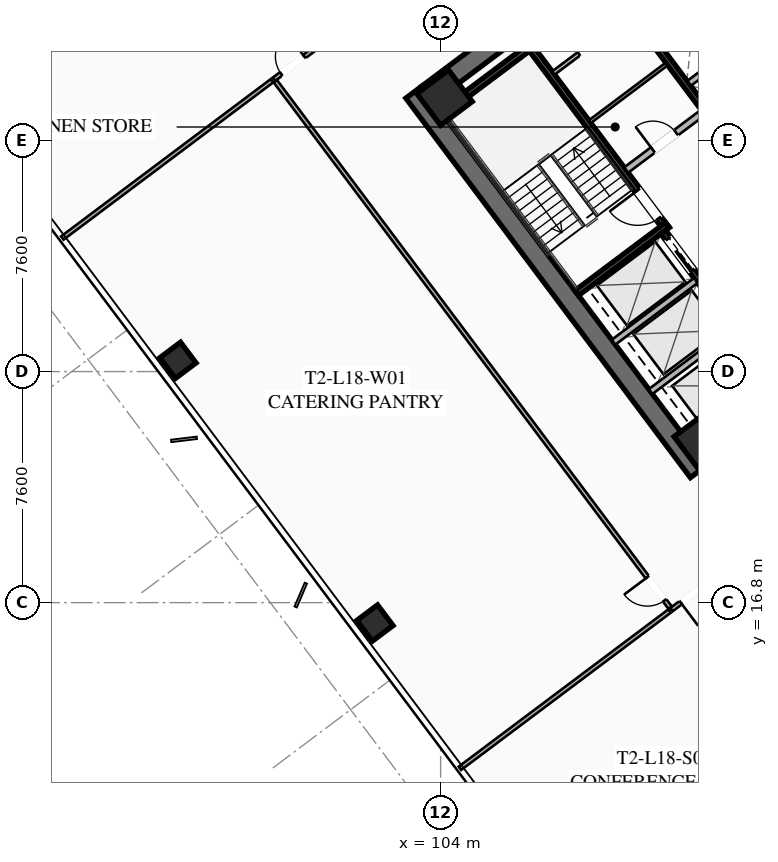
"""IFC4 building model, lengths in metres.
Left out: names, types, materials, properties, quantities, classifications, styles, units other than length and angle.
Written with IfcOpenShell. Run it as: python <this file> out.ifc"""

import sys

from ifc_helpers import new_model, si_unit, direction, frame, frame_2d, origin, origin_2d, place, context, subcontext, project, spatial, rectangle, hollow_rectangle, extrude, element, fill, save


model = new_model("IFC4")
c1 = context("Model", 3, precision=1e-05, world=origin(), true_north=direction((0.0, 1.0)))
c2 = subcontext(c1, "Body", "Model", "MODEL_VIEW")
j1 = project(units=[si_unit("LENGTHUNIT", "METRE"), si_unit("PLANEANGLEUNIT", "RADIAN")], contexts=[c1])
p1 = place(None, origin())
s1 = spatial("IfcSite", under=j1, at=p1, CompositionType="ELEMENT")
p2 = place(p1, origin())
s2 = spatial("IfcBuilding", under=s1, at=p2, CompositionType="ELEMENT")
p3 = place(p2, frame((0.0, 0.0, 70.75)))
s3 = spatial("IfcBuildingStorey", under=s2, at=p3, CompositionType="ELEMENT", Elevation=70.75)
p4 = place(p3, frame((112.476, 21.107, 0.0), z_axis=(0.0, 0.0, 1.0), x_axis=(-0.600005007985, 0.799996243986, 0.0)))
e1 = element("IfcWall", 1, at=p4, inside=s3, PredefinedType="SHEAR", context=c2, shape_type="SweptSolid", body=[
    extrude(rectangle(XDim=15.6, YDim=0.65, at=frame_2d((7.8, 0.0))), origin(), (0.0, 0.0, 1.0), 3.55),
])
p5 = place(p3, frame((124.429, 30.478, 0.0), z_axis=(0.0, 0.0, 1.0), x_axis=(-0.799998028465, -0.600002628705, 0.0)))
e2 = element("IfcWall", 2, at=p5, inside=s3, PredefinedType="SHEAR", context=c2, shape_type="SweptSolid", body=[
    extrude(rectangle(XDim=14.86, YDim=0.65, at=frame_2d((7.43, 0.0))), origin(), (0.0, 0.0, 1.0), 3.55),
])
p6 = place(p5, frame((9.13, 0.0, 0.0)))
e3 = element("IfcOpeningElement", 3, at=p6, cuts=e2, PredefinedType="OPENING", context=c2, shape_type="SweptSolid", body=[
    extrude(rectangle(XDim=1.25, YDim=2.25, at=frame_2d((0.625, 1.125))), frame((0.0, 0.335, 0.0), z_axis=(0.0, -1.0, 0.0), x_axis=(1.0, 0.0, 0.0)), (0.0, 0.0, 1.0), 0.67),
])
p7 = place(p5, frame((4.08, 0.0, 0.0)))
e4 = element("IfcOpeningElement", 4, at=p7, cuts=e2, PredefinedType="OPENING", context=c2, shape_type="SweptSolid", body=[
    extrude(rectangle(XDim=1.25, YDim=2.25, at=frame_2d((0.625, 1.125))), frame((0.0, 0.335, 0.0), z_axis=(0.0, -1.0, 0.0), x_axis=(1.0, 0.0, 0.0)), (0.0, 0.0, 1.0), 0.67),
])
p8 = place(p3, frame((103.571, 33.522, 0.0), z_axis=(0.0, 0.0, 1.0), x_axis=(0.799998028465, 0.600002628705, 0.0)))
e5 = element("IfcWall", 5, at=p8, inside=s3, PredefinedType="SHEAR", context=c2, shape_type="SweptSolid", body=[
    extrude(rectangle(XDim=14.86, YDim=0.65, at=frame_2d((7.43, 0.0))), origin(), (0.0, 0.0, 1.0), 3.55),
])
p9 = place(p8, frame((4.48, 0.0, 0.0)))
e6 = element("IfcOpeningElement", 6, at=p9, cuts=e5, PredefinedType="OPENING", context=c2, shape_type="SweptSolid", body=[
    extrude(rectangle(XDim=1.25, YDim=2.25, at=frame_2d((0.625, 1.125))), frame((0.0, 0.335, 0.0), z_axis=(0.0, -1.0, 0.0), x_axis=(1.0, 0.0, 0.0)), (0.0, 0.0, 1.0), 0.67),
])
p10 = place(p8, frame((9.53, 0.0, 0.0)))
e7 = element("IfcOpeningElement", 7, at=p10, cuts=e5, PredefinedType="OPENING", context=c2, shape_type="SweptSolid", body=[
    extrude(rectangle(XDim=1.25, YDim=2.25, at=frame_2d((0.625, 1.125))), frame((0.0, 0.335, 0.0), z_axis=(0.0, -1.0, 0.0), x_axis=(1.0, 0.0, 0.0)), (0.0, 0.0, 1.0), 0.67),
])
for number, where, z_axis, x_axis in (
    (8, (112.59, 22.13, 0.0), (0.0, 0.0, 1.0), (0.8, 0.6, 0.0)),
    (9, (104.13, 33.41, 0.0), (0.0, 0.0, 1.0), (0.8, 0.6, 0.0)),
):
    element("IfcColumn", number, at=place(p3, frame(where, z_axis=z_axis, x_axis=x_axis)), inside=s3, PredefinedType="COLUMN", context=c2, shape_type="SweptSolid", body=[
        extrude(hollow_rectangle(XDim=1.3, YDim=1.3, WallThickness=0.05, at=origin_2d()), origin(), (0.0, 0.0, 1.0), 3.35),
    ])
for number, where, z_axis, x_axis in (
    (10, (95.36, 24.77, 0.0), (0.0, 0.0, 1.0), (0.8, 0.6, 0.0)),
    (11, (101.84, 16.13, 0.0), (0.0, 0.0, 1.0), (0.8, 0.6, 0.0)),
):
    element("IfcColumn", number, at=place(p3, frame(where, z_axis=z_axis, x_axis=x_axis)), inside=s3, PredefinedType="COLUMN", context=c2, shape_type="SweptSolid", body=[
        extrude(hollow_rectangle(XDim=0.85, YDim=0.85, WallThickness=0.035, at=origin_2d()), origin(), (0.0, 0.0, 1.0), 3.35),
    ])
p11 = place(p3, frame((111.44, 29.08, 0.0), z_axis=(0.0, 0.0, 1.0), x_axis=(-0.600009827119, 0.799992629566, 0.0)))
e12 = element("IfcWall", 12, at=p11, inside=s3, PredefinedType="SHEAR", context=c2, shape_type="SweptSolid", body=[
    extrude(rectangle(XDim=7.95, YDim=0.2, at=frame_2d((3.975, 0.0))), origin(), (0.0, 0.0, 1.0), 3.35),
])
p12 = place(p11, frame((0.45, 0.0, 0.0)))
e13 = element("IfcOpeningElement", 13, at=p12, cuts=e12, PredefinedType="OPENING", context=c2, shape_type="SweptSolid", body=[
    extrude(rectangle(XDim=1.15, YDim=2.2, at=frame_2d((0.575, 1.1))), frame((0.0, 0.11, 0.0), z_axis=(0.0, -1.0, 0.0), x_axis=(1.0, 0.0, 0.0)), (0.0, 0.0, 1.0), 0.22),
])
for number, where, z_axis, x_axis in (
    (14, (108.476, 26.982, 0.0), (0.0, 0.0, 1.0), (0.8, 0.6, 0.0)),
    (15, (104.036, 32.902, 0.0), (0.0, 0.0, 1.0), (0.8, 0.6, 0.0)),
):
    element("IfcWall", number, at=place(p3, frame(where, z_axis=z_axis, x_axis=x_axis)), inside=s3, PredefinedType="SHEAR", context=c2, shape_type="SweptSolid", body=[
        extrude(rectangle(XDim=3.73, YDim=0.2, at=frame_2d((1.865, 0.0))), origin(), (0.0, 0.0, 1.0), 3.35),
    ])
p13 = place(p3, frame((117.938, 26.016, 0.0), z_axis=(0.0, 0.0, 1.0), x_axis=(-0.600005463273, 0.799995902516, 0.0)))
e16 = element("IfcWall", 16, at=p13, inside=s3, PredefinedType="SHEAR", context=c2, shape_type="SweptSolid", body=[
    extrude(rectangle(XDim=14.3, YDim=0.2, at=frame_2d((7.15, 0.0))), origin(), (0.0, 0.0, 1.0), 3.35),
])
p14 = place(p3, frame((110.104, 31.028, 0.0), z_axis=(0.0, 0.0, 1.0), x_axis=(0.800018601094, 0.59997519774, 0.0)))
e17 = element("IfcWall", 17, at=p14, inside=s3, PredefinedType="SOLIDWALL", context=c2, shape_type="SweptSolid", body=[
    extrude(rectangle(XDim=3.15, YDim=0.22, at=frame_2d((1.575, 0.0))), origin(), (0.0, 0.0, 1.0), 2.703),
])
p15 = place(p14, frame((1.1, 0.0, 0.0)))
e18 = element("IfcOpeningElement", 18, at=p15, cuts=e17, PredefinedType="OPENING", context=c2, shape_type="SweptSolid", body=[
    extrude(rectangle(XDim=0.95, YDim=2.05, at=frame_2d((0.475, 1.025))), frame((0.0, 0.12, 0.0), z_axis=(0.0, -1.0, 0.0), x_axis=(1.0, 0.0, 0.0)), (0.0, 0.0, 1.0), 0.24),
])
p16 = place(p3, frame((115.13, 23.91, 0.0), z_axis=(0.0, 0.0, 1.0), x_axis=(-0.599975393228, 0.800018454488, 0.0)))
e19 = element("IfcWall", 19, at=p16, inside=s3, PredefinedType="SHEAR", context=c2, shape_type="SweptSolid", body=[
    extrude(rectangle(XDim=6.35, YDim=0.2, at=frame_2d((3.175, 0.0))), origin(), (0.0, 0.0, 1.0), 3.35),
])
p17 = place(p16, frame((4.775, 0.0, 0.0)))
e20 = element("IfcOpeningElement", 20, at=p17, cuts=e19, PredefinedType="OPENING", context=c2, shape_type="SweptSolid", body=[
    extrude(rectangle(XDim=1.3, YDim=2.25, at=frame_2d((0.65, 1.125))), frame((0.0, 0.11, 0.0), z_axis=(0.0, -1.0, 0.0), x_axis=(1.0, 0.0, 0.0)), (0.0, 0.0, 1.0), 0.22),
])
p18 = place(p16, frame((2.775, 0.0, 0.0)))
e21 = element("IfcOpeningElement", 21, at=p18, cuts=e19, PredefinedType="OPENING", context=c2, shape_type="SweptSolid", body=[
    extrude(rectangle(XDim=1.3, YDim=2.25, at=frame_2d((0.65, 1.125))), frame((0.0, 0.11, 0.0), z_axis=(0.0, -1.0, 0.0), x_axis=(1.0, 0.0, 0.0)), (0.0, 0.0, 1.0), 0.22),
])
p19 = place(p16, frame((0.575, 0.0, 0.0)))
e22 = element("IfcOpeningElement", 22, at=p19, cuts=e19, PredefinedType="OPENING", context=c2, shape_type="SweptSolid", body=[
    extrude(rectangle(XDim=1.3, YDim=2.25, at=frame_2d((0.65, 1.125))), frame((0.0, 0.11, 0.0), z_axis=(0.0, -1.0, 0.0), x_axis=(1.0, 0.0, 0.0)), (0.0, 0.0, 1.0), 0.22),
])
for number, where, z_axis, x_axis in (
    (23, (110.906, 23.742, 0.0), (0.0, 0.0, 1.0), (0.8, 0.6, 0.0)),
    (24, (109.688, 25.366, 0.0), (0.0, 0.0, 1.0), (0.8, 0.6, 0.0)),
):
    element("IfcWall", number, at=place(p3, frame(where, z_axis=z_axis, x_axis=x_axis)), inside=s3, PredefinedType="SOLIDWALL", context=c2, shape_type="SweptSolid", body=[
        extrude(rectangle(XDim=3.38, YDim=0.2, at=frame_2d((1.69, 0.0))), origin(), (0.0, 0.0, 1.0), 3.35),
    ])
p20 = place(p3, frame((107.71, 34.22, 0.0), z_axis=(0.0, 0.0, 1.0), x_axis=(0.799981399002, 0.60002480053, 0.0)))
e25 = element("IfcWall", 25, at=p20, inside=s3, PredefinedType="PARTITIONING", context=c2, shape_type="SweptSolid", body=[
    extrude(rectangle(XDim=3.15, YDim=0.135, at=frame_2d((1.575, 0.0))), origin(), (0.0, 0.0, 1.0), 2.703),
])
p21 = place(p20, frame((1.05, 0.0, 0.0)))
e26 = element("IfcOpeningElement", 26, at=p21, cuts=e25, PredefinedType="OPENING", context=c2, shape_type="SweptSolid", body=[
    extrude(rectangle(XDim=1.05, YDim=2.2, at=frame_2d((0.525, 1.1))), frame((0.0, 0.077, 0.0), z_axis=(0.0, -1.0, 0.0), x_axis=(1.0, 0.0, 0.0)), (0.0, 0.0, 1.0), 0.155),
])
p22 = place(p3, frame((108.91, 32.62, 0.0), z_axis=(0.0, 0.0, 1.0), x_axis=(0.800018601094, 0.59997519774, 0.0)))
e27 = element("IfcWall", 27, at=p22, inside=s3, PredefinedType="PARTITIONING", context=c2, shape_type="SweptSolid", body=[
    extrude(rectangle(XDim=3.15, YDim=0.11, at=frame_2d((1.575, 0.0))), origin(), (0.0, 0.0, 1.0), 2.703),
])
p23 = place(p3, frame((115.11, 33.27, 0.0), z_axis=(0.0, 0.0, 1.0), x_axis=(-0.600011488909, 0.79999138319, 0.0)))
e28 = element("IfcWall", 28, at=p23, inside=s3, PredefinedType="SOLIDWALL", context=c2, shape_type="SweptSolid", body=[
    extrude(rectangle(XDim=6.8, YDim=0.2, at=frame_2d((3.4, 0.0))), origin(), (0.0, 0.0, 1.0), 3.35),
])
p24 = place(p3, frame((112.176, 33.882, 0.0), z_axis=(0.0, 0.0, 1.0), x_axis=(0.8, 0.6, 0.0)))
e29 = element("IfcWall", 29, at=p24, inside=s3, PredefinedType="SOLIDWALL", context=c2, shape_type="SweptSolid", body=[
    extrude(rectangle(XDim=1.88, YDim=0.2, at=frame_2d((0.94, 0.0))), origin(), (0.0, 0.0, 1.0), 3.35),
])
p25 = place(p3, frame((98.516, 34.012, 0.0), z_axis=(0.0, 0.0, 1.0), x_axis=(0.8, 0.6, 0.0)))
e30 = element("IfcWall", 30, at=p25, inside=s3, PredefinedType="PARTITIONING", context=c2, shape_type="SweptSolid", body=[
    extrude(rectangle(XDim=28.23, YDim=0.135, at=frame_2d((14.115, 0.0))), origin(), (0.0, 0.0, 1.0), 2.703),
])
p26 = place(p25, frame((0.3, 0.0, 0.0)))
e31 = element("IfcOpeningElement", 31, at=p26, cuts=e30, PredefinedType="OPENING", context=c2, shape_type="SweptSolid", body=[
    extrude(rectangle(XDim=0.95, YDim=2.05, at=frame_2d((0.475, 1.025))), frame((0.0, 0.077, 0.0), z_axis=(0.0, -1.0, 0.0), x_axis=(1.0, 0.0, 0.0)), (0.0, 0.0, 1.0), 0.155),
])
p27 = place(p25, frame((6.84, 0.0, 0.0)))
e32 = element("IfcOpeningElement", 32, at=p27, cuts=e30, PredefinedType="OPENING", context=c2, shape_type="SweptSolid", body=[
    extrude(rectangle(XDim=0.95, YDim=2.05, at=frame_2d((0.475, 1.025))), frame((0.0, 0.077, 0.0), z_axis=(0.0, -1.0, 0.0), x_axis=(1.0, 0.0, 0.0)), (0.0, 0.0, 1.0), 0.155),
])
p28 = place(p25, frame((10.863, 0.0, 0.0)))
e33 = element("IfcOpeningElement", 33, at=p28, cuts=e30, PredefinedType="OPENING", context=c2, shape_type="SweptSolid", body=[
    extrude(rectangle(XDim=0.95, YDim=2.05, at=frame_2d((0.475, 1.025))), frame((0.0, 0.077, 0.0), z_axis=(0.0, -1.0, 0.0), x_axis=(1.0, 0.0, 0.0)), (0.0, 0.0, 1.0), 0.155),
])
p29 = place(p25, frame((26.98, 0.0, 0.0)))
e34 = element("IfcOpeningElement", 34, at=p29, cuts=e30, PredefinedType="OPENING", context=c2, shape_type="SweptSolid", body=[
    extrude(rectangle(XDim=0.95, YDim=2.05, at=frame_2d((0.475, 1.025))), frame((0.0, 0.077, 0.0), z_axis=(0.0, -1.0, 0.0), x_axis=(1.0, 0.0, 0.0)), (0.0, 0.0, 1.0), 0.155),
])
p30 = place(p3, frame((134.18, 33.51, 0.0), z_axis=(0.0, 0.0, 1.0), x_axis=(-0.8, -0.6, 0.0)))
e35 = element("IfcWall", 35, at=p30, inside=s3, PredefinedType="PARTITIONING", context=c2, shape_type="SweptSolid", body=[
    extrude(rectangle(XDim=28.23, YDim=0.135, at=frame_2d((14.115, 0.0))), origin(), (0.0, 0.0, 1.0), 2.703),
])
p31 = place(p30, frame((26.9, 0.0, 0.0)))
e36 = element("IfcOpeningElement", 36, at=p31, cuts=e35, PredefinedType="OPENING", context=c2, shape_type="SweptSolid", body=[
    extrude(rectangle(XDim=0.95, YDim=2.05, at=frame_2d((0.475, 1.025))), frame((0.0, 0.077, 0.0), z_axis=(0.0, -1.0, 0.0), x_axis=(1.0, 0.0, 0.0)), (0.0, 0.0, 1.0), 0.155),
])
p32 = place(p30, frame((20.399, 0.0, 0.0)))
e37 = element("IfcOpeningElement", 37, at=p32, cuts=e35, PredefinedType="OPENING", context=c2, shape_type="SweptSolid", body=[
    extrude(rectangle(XDim=0.95, YDim=2.05, at=frame_2d((0.475, 1.025))), frame((0.0, 0.077, 0.0), z_axis=(0.0, -1.0, 0.0), x_axis=(1.0, 0.0, 0.0)), (0.0, 0.0, 1.0), 0.155),
])
p33 = place(p30, frame((16.339, 0.0, 0.0)))
e38 = element("IfcOpeningElement", 38, at=p33, cuts=e35, PredefinedType="OPENING", context=c2, shape_type="SweptSolid", body=[
    extrude(rectangle(XDim=0.95, YDim=2.05, at=frame_2d((0.475, 1.025))), frame((0.0, 0.077, 0.0), z_axis=(0.0, -1.0, 0.0), x_axis=(1.0, 0.0, 0.0)), (0.0, 0.0, 1.0), 0.155),
])
p34 = place(p30, frame((0.38, 0.0, 0.0)))
e39 = element("IfcOpeningElement", 39, at=p34, cuts=e35, PredefinedType="OPENING", context=c2, shape_type="SweptSolid", body=[
    extrude(rectangle(XDim=0.95, YDim=2.05, at=frame_2d((0.475, 1.025))), frame((0.0, 0.077, 0.0), z_axis=(0.0, -1.0, 0.0), x_axis=(1.0, 0.0, 0.0)), (0.0, 0.0, 1.0), 0.155),
])
p35 = place(p3, frame((111.548, 16.636, 0.0), z_axis=(0.0, 0.0, 1.0), x_axis=(-0.600003610192, 0.799997292343, 0.0)))
e40 = element("IfcWall", 40, at=p35, inside=s3, PredefinedType="PARTITIONING", context=c2, shape_type="SweptSolid", body=[
    extrude(rectangle(XDim=21.64, YDim=0.135, at=frame_2d((10.82, 0.0))), origin(), (0.0, 0.0, 1.0), 2.703),
])
p36 = place(p35, frame((0.3, 0.0, 0.0)))
e41 = element("IfcOpeningElement", 41, at=p36, cuts=e40, PredefinedType="OPENING", context=c2, shape_type="SweptSolid", body=[
    extrude(rectangle(XDim=0.95, YDim=2.05, at=frame_2d((0.475, 1.025))), frame((0.0, 0.077, 0.0), z_axis=(0.0, -1.0, 0.0), x_axis=(1.0, 0.0, 0.0)), (0.0, 0.0, 1.0), 0.155),
])
p37 = place(p3, frame((98.452, 33.964, 0.0), z_axis=(0.0, 0.0, 1.0), x_axis=(-0.799993202584, -0.600009063115, 0.0)))
e42 = element("IfcWall", 42, at=p37, inside=s3, PredefinedType="PARTITIONING", context=c2, shape_type="SweptSolid", body=[
    extrude(rectangle(XDim=8.62, YDim=0.135, at=frame_2d((4.31, 0.0))), origin(), (0.0, 0.0, 1.0), 2.703),
])
p38 = place(p3, frame((104.636, 11.352, 0.0), z_axis=(0.0, 0.0, 1.0), x_axis=(0.800006797429, 0.599990936654, 0.0)))
e43 = element("IfcWall", 43, at=p38, inside=s3, PredefinedType="PARTITIONING", context=c2, shape_type="SweptSolid", body=[
    extrude(rectangle(XDim=8.62, YDim=0.135, at=frame_2d((4.31, 0.0))), origin(), (0.0, 0.0, 1.0), 2.703),
])
p39 = place(p12, origin())
e44 = element("IfcDoor", 44, at=p39, inside=s3, OperationType="SINGLE_SWING_RIGHT", PredefinedType="DOOR", context=c2, shape_type="SweptSolid", body=[
    extrude(rectangle(XDim=1.15, YDim=2.2, at=frame_2d((0.575, 1.1))), frame((0.0, 0.025, 0.0), z_axis=(0.0, -1.0, 0.0), x_axis=(1.0, 0.0, 0.0)), (0.0, 0.0, 1.0), 0.05),
])
fill(e13, e44)
p40 = place(p21, origin())
e45 = element("IfcDoor", 45, at=p40, inside=s3, OperationType="SINGLE_SWING_RIGHT", PredefinedType="DOOR", context=c2, shape_type="SweptSolid", body=[
    extrude(rectangle(XDim=1.05, YDim=2.2, at=frame_2d((0.525, 1.1))), frame((0.0, 0.025, 0.0), z_axis=(0.0, -1.0, 0.0), x_axis=(1.0, 0.0, 0.0)), (0.0, 0.0, 1.0), 0.05),
])
fill(e26, e45)
p41 = place(p15, origin())
e46 = element("IfcDoor", 46, at=p41, inside=s3, OperationType="SINGLE_SWING_LEFT", PredefinedType="DOOR", context=c2, shape_type="SweptSolid", body=[
    extrude(rectangle(XDim=0.95, YDim=2.05, at=frame_2d((0.475, 1.025))), frame((0.0, 0.025, 0.0), z_axis=(0.0, -1.0, 0.0), x_axis=(1.0, 0.0, 0.0)), (0.0, 0.0, 1.0), 0.05),
])
fill(e18, e46)
p42 = place(p26, origin())
e47 = element("IfcDoor", 47, at=p42, inside=s3, OperationType="SINGLE_SWING_RIGHT", PredefinedType="DOOR", context=c2, shape_type="SweptSolid", body=[
    extrude(rectangle(XDim=0.95, YDim=2.05, at=frame_2d((0.475, 1.025))), frame((0.0, 0.025, 0.0), z_axis=(0.0, -1.0, 0.0), x_axis=(1.0, 0.0, 0.0)), (0.0, 0.0, 1.0), 0.05),
])
fill(e31, e47)
p43 = place(p31, origin())
e48 = element("IfcDoor", 48, at=p43, inside=s3, OperationType="SINGLE_SWING_RIGHT", PredefinedType="DOOR", context=c2, shape_type="SweptSolid", body=[
    extrude(rectangle(XDim=0.95, YDim=2.05, at=frame_2d((0.475, 1.025))), frame((0.0, 0.025, 0.0), z_axis=(0.0, -1.0, 0.0), x_axis=(1.0, 0.0, 0.0)), (0.0, 0.0, 1.0), 0.05),
])
fill(e36, e48)
p44 = place(p36, origin())
e49 = element("IfcDoor", 49, at=p44, inside=s3, OperationType="SINGLE_SWING_RIGHT", PredefinedType="DOOR", context=c2, shape_type="SweptSolid", body=[
    extrude(rectangle(XDim=0.95, YDim=2.05, at=frame_2d((0.475, 1.025))), frame((0.0, 0.025, 0.0), z_axis=(0.0, -1.0, 0.0), x_axis=(1.0, 0.0, 0.0)), (0.0, 0.0, 1.0), 0.05),
])
fill(e41, e49)
p45 = place(p17, origin())
e50 = element("IfcDoor", 50, at=p45, inside=s3, OperationType="SLIDING_TO_LEFT", PredefinedType="DOOR", context=c2, shape_type="SweptSolid", body=[
    extrude(rectangle(XDim=1.3, YDim=2.25, at=frame_2d((0.65, 1.125))), frame((0.0, 0.025, 0.0), z_axis=(0.0, -1.0, 0.0), x_axis=(1.0, 0.0, 0.0)), (0.0, 0.0, 1.0), 0.05),
])
fill(e20, e50)
save(model, sys.argv[1])
